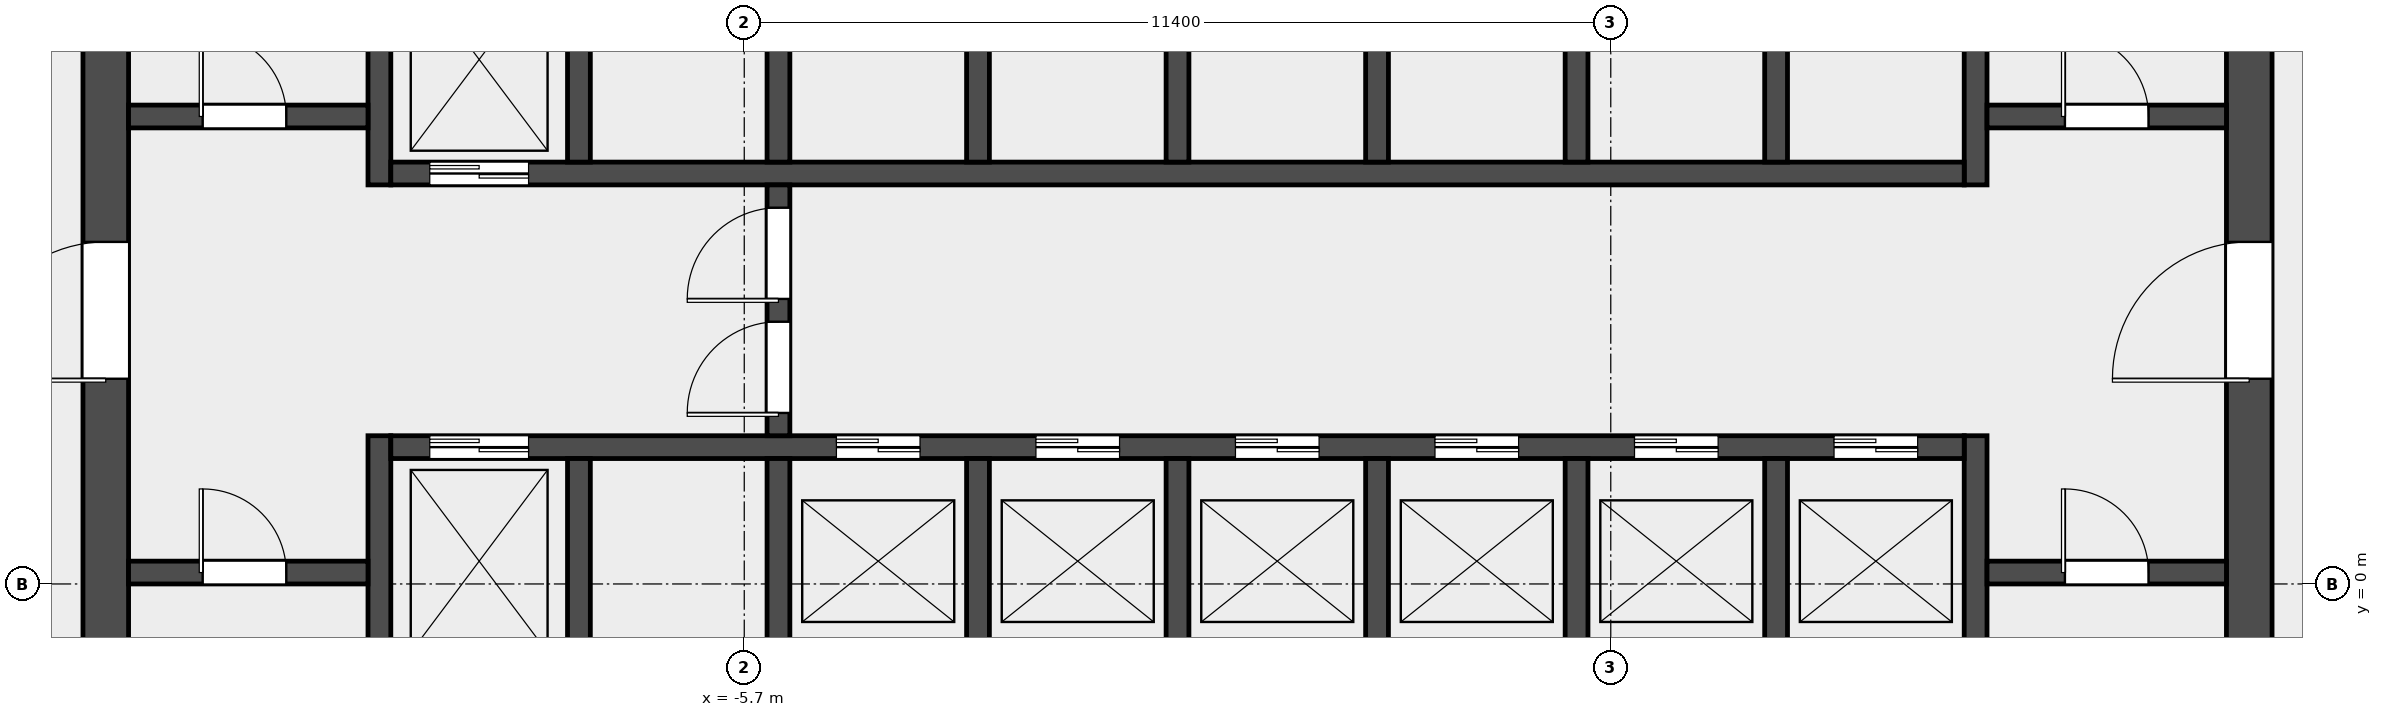
"""IFC4 building model, lengths in metres.
Left out: names, types, materials, properties, quantities, classifications, styles, units other than length and angle.
Written with IfcOpenShell. Run it as: python <this file> out.ifc"""

import sys

from ifc_helpers import new_model, si_unit, direction, frame, frame_2d, origin, place, context, subcontext, project, spatial, rectangle, extrude, element, fill, save


model = new_model("IFC4")
c1 = context("Model", 3, precision=1e-05, world=origin(), true_north=direction((0.0, 1.0)))
c2 = subcontext(c1, "Body", "Model", "MODEL_VIEW")
j1 = project(units=[si_unit("LENGTHUNIT", "METRE"), si_unit("PLANEANGLEUNIT", "RADIAN")], contexts=[c1])
p1 = place(None, origin())
s1 = spatial("IfcSite", under=j1, at=p1, CompositionType="ELEMENT")
p2 = place(p1, origin())
s2 = spatial("IfcBuilding", under=s1, at=p2, CompositionType="ELEMENT")
p3 = place(p2, frame((0.0, 0.0, 181.0)))
s3 = spatial("IfcBuildingStorey", under=s2, at=p3, CompositionType="ELEMENT", Elevation=181.0)
p4 = place(p3, frame((-14.1, -6.6, 0.0), z_axis=(0.0, 0.0, 1.0), x_axis=(0.0, 1.0, 0.0)))
e1 = element("IfcWall", 1, at=p4, inside=s3, PredefinedType="SHEAR", context=c2, shape_type="SweptSolid", body=[
    extrude(rectangle(XDim=19.5, YDim=0.6, at=frame_2d((9.75, 0.0))), origin(), (0.0, 0.0, 1.0), 3.7),
])
p5 = place(p4, frame((9.3, 0.0, 0.0)))
e2 = element("IfcOpeningElement", 2, at=p5, cuts=e1, PredefinedType="OPENING", context=c2, shape_type="SweptSolid", body=[
    extrude(rectangle(XDim=1.8, YDim=2.1, at=frame_2d((0.9, 1.05))), frame((0.0, 0.312, 0.0), z_axis=(0.0, -1.0, 0.0), x_axis=(1.0, 0.0, 0.0)), (0.0, 0.0, 1.0), 0.624),
])
p6 = place(p3, frame((14.1, -6.6, 0.0), z_axis=(0.0, 0.0, 1.0), x_axis=(0.0, 1.0, 0.0)))
e3 = element("IfcWall", 3, at=p6, inside=s3, PredefinedType="SHEAR", context=c2, shape_type="SweptSolid", body=[
    extrude(rectangle(XDim=19.5, YDim=0.6, at=frame_2d((9.75, 0.0))), origin(), (0.0, 0.0, 1.0), 3.7),
])
p7 = place(p6, frame((9.3, 0.0, 0.0)))
e4 = element("IfcOpeningElement", 4, at=p7, cuts=e3, PredefinedType="OPENING", context=c2, shape_type="SweptSolid", body=[
    extrude(rectangle(XDim=1.8, YDim=2.1, at=frame_2d((0.9, 1.05))), frame((0.0, 0.312, 0.0), z_axis=(0.0, -1.0, 0.0), x_axis=(1.0, 0.0, 0.0)), (0.0, 0.0, 1.0), 0.624),
])
p8 = place(p3, frame((-10.5, -6.6, 0.0), z_axis=(0.0, 0.0, 1.0), x_axis=(0.0, 1.0, 0.0)))
e5 = element("IfcWall", 5, at=p8, inside=s3, PredefinedType="SHEAR", context=c2, shape_type="SweptSolid", body=[
    extrude(rectangle(XDim=8.55, YDim=0.3, at=frame_2d((4.275, 0.0))), origin(), (0.0, 0.0, 1.0), 3.7),
])
p9 = place(p3, frame((-10.5, 5.25, 0.0), z_axis=(0.0, 0.0, 1.0), x_axis=(0.0, 1.0, 0.0)))
e6 = element("IfcWall", 6, at=p9, inside=s3, PredefinedType="SHEAR", context=c2, shape_type="SweptSolid", body=[
    extrude(rectangle(XDim=7.65, YDim=0.3, at=frame_2d((3.825, 0.0))), origin(), (0.0, 0.0, 1.0), 3.7),
])
p10 = place(p3, frame((10.5, -6.6, 0.0), z_axis=(0.0, 0.0, 1.0), x_axis=(0.0, 1.0, 0.0)))
e7 = element("IfcWall", 7, at=p10, inside=s3, PredefinedType="SHEAR", context=c2, shape_type="SweptSolid", body=[
    extrude(rectangle(XDim=8.55, YDim=0.3, at=frame_2d((4.275, 0.0))), origin(), (0.0, 0.0, 1.0), 3.7),
])
p11 = place(p3, frame((10.5, 5.25, 0.0), z_axis=(0.0, 0.0, 1.0), x_axis=(0.0, 1.0, 0.0)))
e8 = element("IfcWall", 8, at=p11, inside=s3, PredefinedType="SHEAR", context=c2, shape_type="SweptSolid", body=[
    extrude(rectangle(XDim=7.65, YDim=0.3, at=frame_2d((3.825, 0.0))), origin(), (0.0, 0.0, 1.0), 3.7),
])
p12 = place(p3, frame((-13.8, 0.15, 0.0), z_axis=(0.0, 0.0, 1.0), x_axis=(1.0, 0.0, 0.0)))
e9 = element("IfcWall", 9, at=p12, inside=s3, PredefinedType="SOLIDWALL", context=c2, shape_type="SweptSolid", body=[
    extrude(rectangle(XDim=3.15, YDim=0.3, at=frame_2d((1.575, 0.0))), origin(), (0.0, 0.0, 1.0), 3.7),
])
p13 = place(p12, frame((0.975, 0.0, 0.0)))
e10 = element("IfcOpeningElement", 10, at=p13, cuts=e9, PredefinedType="OPENING", context=c2, shape_type="SweptSolid", body=[
    extrude(rectangle(XDim=1.1, YDim=2.1, at=frame_2d((0.55, 1.05))), frame((0.0, 0.162, 0.0), z_axis=(0.0, -1.0, 0.0), x_axis=(1.0, 0.0, 0.0)), (0.0, 0.0, 1.0), 0.324),
])
p14 = place(p3, frame((-13.8, 6.15, 0.0), z_axis=(0.0, 0.0, 1.0), x_axis=(1.0, 0.0, 0.0)))
e11 = element("IfcWall", 11, at=p14, inside=s3, PredefinedType="SOLIDWALL", context=c2, shape_type="SweptSolid", body=[
    extrude(rectangle(XDim=3.15, YDim=0.3, at=frame_2d((1.575, 0.0))), origin(), (0.0, 0.0, 1.0), 3.7),
])
p15 = place(p14, frame((0.975, 0.0, 0.0)))
e12 = element("IfcOpeningElement", 12, at=p15, cuts=e11, PredefinedType="OPENING", context=c2, shape_type="SweptSolid", body=[
    extrude(rectangle(XDim=1.1, YDim=2.1, at=frame_2d((0.55, 1.05))), frame((0.0, 0.162, 0.0), z_axis=(0.0, -1.0, 0.0), x_axis=(1.0, 0.0, 0.0)), (0.0, 0.0, 1.0), 0.324),
])
p16 = place(p3, frame((10.65, 0.15, 0.0), z_axis=(0.0, 0.0, 1.0), x_axis=(1.0, 0.0, 0.0)))
e13 = element("IfcWall", 13, at=p16, inside=s3, PredefinedType="SOLIDWALL", context=c2, shape_type="SweptSolid", body=[
    extrude(rectangle(XDim=3.15, YDim=0.3, at=frame_2d((1.575, 0.0))), origin(), (0.0, 0.0, 1.0), 3.7),
])
p17 = place(p16, frame((1.025, 0.0, 0.0)))
e14 = element("IfcOpeningElement", 14, at=p17, cuts=e13, PredefinedType="OPENING", context=c2, shape_type="SweptSolid", body=[
    extrude(rectangle(XDim=1.1, YDim=2.1, at=frame_2d((0.55, 1.05))), frame((0.0, 0.162, 0.0), z_axis=(0.0, -1.0, 0.0), x_axis=(1.0, 0.0, 0.0)), (0.0, 0.0, 1.0), 0.324),
])
p18 = place(p3, frame((10.65, 6.15, 0.0), z_axis=(0.0, 0.0, 1.0), x_axis=(1.0, 0.0, 0.0)))
e15 = element("IfcWall", 15, at=p18, inside=s3, PredefinedType="SOLIDWALL", context=c2, shape_type="SweptSolid", body=[
    extrude(rectangle(XDim=3.15, YDim=0.3, at=frame_2d((1.575, 0.0))), origin(), (0.0, 0.0, 1.0), 3.7),
])
p19 = place(p18, frame((1.025, 0.0, 0.0)))
e16 = element("IfcOpeningElement", 16, at=p19, cuts=e15, PredefinedType="OPENING", context=c2, shape_type="SweptSolid", body=[
    extrude(rectangle(XDim=1.1, YDim=2.1, at=frame_2d((0.55, 1.05))), frame((0.0, 0.162, 0.0), z_axis=(0.0, -1.0, 0.0), x_axis=(1.0, 0.0, 0.0)), (0.0, 0.0, 1.0), 0.324),
])
p20 = place(p3, frame((-10.35, 1.8, 0.0), z_axis=(0.0, 0.0, 1.0), x_axis=(1.0, 0.0, 0.0)))
e17 = element("IfcWall", 17, at=p20, inside=s3, PredefinedType="SOLIDWALL", context=c2, shape_type="SweptSolid", body=[
    extrude(rectangle(XDim=20.7, YDim=0.3, at=frame_2d((10.35, 0.0))), origin(), (0.0, 0.0, 1.0), 3.7),
])
p21 = place(p20, frame((0.512, 0.0, 0.0)))
e18 = element("IfcOpeningElement", 18, at=p21, cuts=e17, PredefinedType="OPENING", context=c2, shape_type="SweptSolid", body=[
    extrude(rectangle(XDim=1.3, YDim=2.1, at=frame_2d((0.65, 1.05))), frame((0.0, 0.162, 0.0), z_axis=(0.0, -1.0, 0.0), x_axis=(1.0, 0.0, 0.0)), (0.0, 0.0, 1.0), 0.324),
])
p22 = place(p20, frame((5.863, 0.0, 0.0)))
e19 = element("IfcOpeningElement", 19, at=p22, cuts=e17, PredefinedType="OPENING", context=c2, shape_type="SweptSolid", body=[
    extrude(rectangle(XDim=1.1, YDim=2.1, at=frame_2d((0.55, 1.05))), frame((0.0, 0.162, 0.0), z_axis=(0.0, -1.0, 0.0), x_axis=(1.0, 0.0, 0.0)), (0.0, 0.0, 1.0), 0.324),
])
p23 = place(p20, frame((8.488, 0.0, 0.0)))
e20 = element("IfcOpeningElement", 20, at=p23, cuts=e17, PredefinedType="OPENING", context=c2, shape_type="SweptSolid", body=[
    extrude(rectangle(XDim=1.1, YDim=2.1, at=frame_2d((0.55, 1.05))), frame((0.0, 0.162, 0.0), z_axis=(0.0, -1.0, 0.0), x_axis=(1.0, 0.0, 0.0)), (0.0, 0.0, 1.0), 0.324),
])
p24 = place(p20, frame((11.113, 0.0, 0.0)))
e21 = element("IfcOpeningElement", 21, at=p24, cuts=e17, PredefinedType="OPENING", context=c2, shape_type="SweptSolid", body=[
    extrude(rectangle(XDim=1.1, YDim=2.1, at=frame_2d((0.55, 1.05))), frame((0.0, 0.162, 0.0), z_axis=(0.0, -1.0, 0.0), x_axis=(1.0, 0.0, 0.0)), (0.0, 0.0, 1.0), 0.324),
])
p25 = place(p20, frame((13.738, 0.0, 0.0)))
e22 = element("IfcOpeningElement", 22, at=p25, cuts=e17, PredefinedType="OPENING", context=c2, shape_type="SweptSolid", body=[
    extrude(rectangle(XDim=1.1, YDim=2.1, at=frame_2d((0.55, 1.05))), frame((0.0, 0.162, 0.0), z_axis=(0.0, -1.0, 0.0), x_axis=(1.0, 0.0, 0.0)), (0.0, 0.0, 1.0), 0.324),
])
p26 = place(p20, frame((16.363, 0.0, 0.0)))
e23 = element("IfcOpeningElement", 23, at=p26, cuts=e17, PredefinedType="OPENING", context=c2, shape_type="SweptSolid", body=[
    extrude(rectangle(XDim=1.1, YDim=2.1, at=frame_2d((0.55, 1.05))), frame((0.0, 0.162, 0.0), z_axis=(0.0, -1.0, 0.0), x_axis=(1.0, 0.0, 0.0)), (0.0, 0.0, 1.0), 0.324),
])
p27 = place(p20, frame((18.988, 0.0, 0.0)))
e24 = element("IfcOpeningElement", 24, at=p27, cuts=e17, PredefinedType="OPENING", context=c2, shape_type="SweptSolid", body=[
    extrude(rectangle(XDim=1.1, YDim=2.1, at=frame_2d((0.55, 1.05))), frame((0.0, 0.162, 0.0), z_axis=(0.0, -1.0, 0.0), x_axis=(1.0, 0.0, 0.0)), (0.0, 0.0, 1.0), 0.324),
])
p28 = place(p3, frame((-10.35, 5.4, 0.0), z_axis=(0.0, 0.0, 1.0), x_axis=(1.0, 0.0, 0.0)))
e25 = element("IfcWall", 25, at=p28, inside=s3, PredefinedType="SOLIDWALL", context=c2, shape_type="SweptSolid", body=[
    extrude(rectangle(XDim=20.7, YDim=0.3, at=frame_2d((10.35, 0.0))), origin(), (0.0, 0.0, 1.0), 3.7),
])
p29 = place(p28, frame((0.512, 0.0, 0.0)))
e26 = element("IfcOpeningElement", 26, at=p29, cuts=e25, PredefinedType="OPENING", context=c2, shape_type="SweptSolid", body=[
    extrude(rectangle(XDim=1.3, YDim=2.1, at=frame_2d((0.65, 1.05))), frame((0.0, 0.162, 0.0), z_axis=(0.0, -1.0, 0.0), x_axis=(1.0, 0.0, 0.0)), (0.0, 0.0, 1.0), 0.324),
])
for number, where, z_axis, x_axis in (
    (27, (-7.875, -1.05, 0.0), (0.0, 0.0, 1.0), (0.0, 1.0, 0.0)),
    (28, (-5.25, -1.05, 0.0), (0.0, 0.0, 1.0), (0.0, 1.0, 0.0)),
    (29, (-2.625, -1.05, 0.0), (0.0, 0.0, 1.0), (0.0, 1.0, 0.0)),
    (30, (0.0, -1.05, 0.0), (0.0, 0.0, 1.0), (0.0, 1.0, 0.0)),
    (31, (2.625, -1.05, 0.0), (0.0, 0.0, 1.0), (0.0, 1.0, 0.0)),
    (32, (5.25, -1.05, 0.0), (0.0, 0.0, 1.0), (0.0, 1.0, 0.0)),
    (33, (7.875, -1.05, 0.0), (0.0, 0.0, 1.0), (0.0, 1.0, 0.0)),
    (34, (-7.875, 5.55, 0.0), (0.0, 0.0, 1.0), (0.0, 1.0, 0.0)),
    (35, (-5.25, 5.55, 0.0), (0.0, 0.0, 1.0), (0.0, 1.0, 0.0)),
    (36, (-2.625, 5.55, 0.0), (0.0, 0.0, 1.0), (0.0, 1.0, 0.0)),
    (37, (0.0, 5.55, 0.0), (0.0, 0.0, 1.0), (0.0, 1.0, 0.0)),
    (38, (2.625, 5.55, 0.0), (0.0, 0.0, 1.0), (0.0, 1.0, 0.0)),
    (39, (5.25, 5.55, 0.0), (0.0, 0.0, 1.0), (0.0, 1.0, 0.0)),
    (40, (7.875, 5.55, 0.0), (0.0, 0.0, 1.0), (0.0, 1.0, 0.0)),
):
    element("IfcWall", number, at=place(p3, frame(where, z_axis=z_axis, x_axis=x_axis)), inside=s3, PredefinedType="SOLIDWALL", context=c2, shape_type="SweptSolid", body=[
        extrude(rectangle(XDim=2.7, YDim=0.3, at=frame_2d((1.35, 0.0))), origin(), (0.0, 0.0, 1.0), 3.7),
    ])
p30 = place(p3, frame((-5.25, 1.95, 0.0), z_axis=(0.0, 0.0, 1.0), x_axis=(0.0, 1.0, 0.0)))
e41 = element("IfcWall", 41, at=p30, inside=s3, PredefinedType="SOLIDWALL", context=c2, shape_type="SweptSolid", body=[
    extrude(rectangle(XDim=3.3, YDim=0.3, at=frame_2d((1.65, 0.0))), origin(), (0.0, 0.0, 1.0), 3.7),
])
p31 = place(p30, frame((0.3, 0.0, 0.0)))
e42 = element("IfcOpeningElement", 42, at=p31, cuts=e41, PredefinedType="OPENING", context=c2, shape_type="SweptSolid", body=[
    extrude(rectangle(XDim=1.2, YDim=2.1, at=frame_2d((0.6, 1.05))), frame((0.0, 0.162, 0.0), z_axis=(0.0, -1.0, 0.0), x_axis=(1.0, 0.0, 0.0)), (0.0, 0.0, 1.0), 0.324),
])
p32 = place(p30, frame((1.8, 0.0, 0.0)))
e43 = element("IfcOpeningElement", 43, at=p32, cuts=e41, PredefinedType="OPENING", context=c2, shape_type="SweptSolid", body=[
    extrude(rectangle(XDim=1.2, YDim=2.1, at=frame_2d((0.6, 1.05))), frame((0.0, 0.162, 0.0), z_axis=(0.0, -1.0, 0.0), x_axis=(1.0, 0.0, 0.0)), (0.0, 0.0, 1.0), 0.324),
])
p33 = place(p13, origin())
e44 = element("IfcDoor", 44, at=p33, inside=s3, OperationType="SINGLE_SWING_LEFT", PredefinedType="DOOR", context=c2, shape_type="SweptSolid", body=[
    extrude(rectangle(XDim=1.1, YDim=2.1, at=frame_2d((0.55, 1.05))), frame((0.0, 0.025, 0.0), z_axis=(0.0, -1.0, 0.0), x_axis=(1.0, 0.0, 0.0)), (0.0, 0.0, 1.0), 0.05),
])
fill(e10, e44)
p34 = place(p15, origin())
e45 = element("IfcDoor", 45, at=p34, inside=s3, OperationType="SINGLE_SWING_LEFT", PredefinedType="DOOR", context=c2, shape_type="SweptSolid", body=[
    extrude(rectangle(XDim=1.1, YDim=2.1, at=frame_2d((0.55, 1.05))), frame((0.0, 0.025, 0.0), z_axis=(0.0, -1.0, 0.0), x_axis=(1.0, 0.0, 0.0)), (0.0, 0.0, 1.0), 0.05),
])
fill(e12, e45)
p35 = place(p17, origin())
e46 = element("IfcDoor", 46, at=p35, inside=s3, OperationType="SINGLE_SWING_RIGHT", PredefinedType="DOOR", context=c2, shape_type="SweptSolid", body=[
    extrude(rectangle(XDim=1.1, YDim=2.1, at=frame_2d((0.55, 1.05))), frame((0.0, 0.025, 0.0), z_axis=(0.0, -1.0, 0.0), x_axis=(1.0, 0.0, 0.0)), (0.0, 0.0, 1.0), 0.05),
])
fill(e14, e46)
p36 = place(p19, origin())
e47 = element("IfcDoor", 47, at=p36, inside=s3, OperationType="SINGLE_SWING_RIGHT", PredefinedType="DOOR", context=c2, shape_type="SweptSolid", body=[
    extrude(rectangle(XDim=1.1, YDim=2.1, at=frame_2d((0.55, 1.05))), frame((0.0, 0.025, 0.0), z_axis=(0.0, -1.0, 0.0), x_axis=(1.0, 0.0, 0.0)), (0.0, 0.0, 1.0), 0.05),
])
fill(e16, e47)
p37 = place(p5, origin())
e48 = element("IfcDoor", 48, at=p37, inside=s3, OperationType="DOUBLE_DOOR_SINGLE_SWING", PredefinedType="DOOR", context=c2, shape_type="SweptSolid", body=[
    extrude(rectangle(XDim=1.8, YDim=2.1, at=frame_2d((0.9, 1.05))), frame((0.0, 0.025, 0.0), z_axis=(0.0, -1.0, 0.0), x_axis=(1.0, 0.0, 0.0)), (0.0, 0.0, 1.0), 0.05),
])
fill(e2, e48)
p38 = place(p7, origin())
e49 = element("IfcDoor", 49, at=p38, inside=s3, OperationType="DOUBLE_DOOR_SINGLE_SWING", PredefinedType="DOOR", context=c2, shape_type="SweptSolid", body=[
    extrude(rectangle(XDim=1.8, YDim=2.1, at=frame_2d((0.9, 1.05))), frame((0.0, 0.025, 0.0), z_axis=(0.0, -1.0, 0.0), x_axis=(1.0, 0.0, 0.0)), (0.0, 0.0, 1.0), 0.05),
])
fill(e4, e49)
p39 = place(p31, origin())
e50 = element("IfcDoor", 50, at=p39, inside=s3, OperationType="SINGLE_SWING_LEFT", PredefinedType="DOOR", context=c2, shape_type="SweptSolid", body=[
    extrude(rectangle(XDim=1.2, YDim=2.1, at=frame_2d((0.6, 1.05))), frame((0.0, 0.025, 0.0), z_axis=(0.0, -1.0, 0.0), x_axis=(1.0, 0.0, 0.0)), (0.0, 0.0, 1.0), 0.05),
])
fill(e42, e50)
p40 = place(p32, origin())
e51 = element("IfcDoor", 51, at=p40, inside=s3, OperationType="SINGLE_SWING_RIGHT", PredefinedType="DOOR", context=c2, shape_type="SweptSolid", body=[
    extrude(rectangle(XDim=1.2, YDim=2.1, at=frame_2d((0.6, 1.05))), frame((0.0, 0.025, 0.0), z_axis=(0.0, -1.0, 0.0), x_axis=(1.0, 0.0, 0.0)), (0.0, 0.0, 1.0), 0.05),
])
fill(e43, e51)
p41 = place(p21, origin())
e52 = element("IfcDoor", 52, at=p41, inside=s3, OperationType="DOUBLE_DOOR_SLIDING", PredefinedType="DOOR", context=c2, shape_type="SweptSolid", body=[
    extrude(rectangle(XDim=1.3, YDim=2.1, at=frame_2d((0.65, 1.05))), frame((0.0, 0.025, 0.0), z_axis=(0.0, -1.0, 0.0), x_axis=(1.0, 0.0, 0.0)), (0.0, 0.0, 1.0), 0.05),
])
fill(e18, e52)
p42 = place(p22, origin())
e53 = element("IfcDoor", 53, at=p42, inside=s3, OperationType="DOUBLE_DOOR_SLIDING", PredefinedType="DOOR", context=c2, shape_type="SweptSolid", body=[
    extrude(rectangle(XDim=1.1, YDim=2.1, at=frame_2d((0.55, 1.05))), frame((0.0, 0.025, 0.0), z_axis=(0.0, -1.0, 0.0), x_axis=(1.0, 0.0, 0.0)), (0.0, 0.0, 1.0), 0.05),
])
fill(e19, e53)
p43 = place(p23, origin())
e54 = element("IfcDoor", 54, at=p43, inside=s3, OperationType="DOUBLE_DOOR_SLIDING", PredefinedType="DOOR", context=c2, shape_type="SweptSolid", body=[
    extrude(rectangle(XDim=1.1, YDim=2.1, at=frame_2d((0.55, 1.05))), frame((0.0, 0.025, 0.0), z_axis=(0.0, -1.0, 0.0), x_axis=(1.0, 0.0, 0.0)), (0.0, 0.0, 1.0), 0.05),
])
fill(e20, e54)
p44 = place(p24, origin())
e55 = element("IfcDoor", 55, at=p44, inside=s3, OperationType="DOUBLE_DOOR_SLIDING", PredefinedType="DOOR", context=c2, shape_type="SweptSolid", body=[
    extrude(rectangle(XDim=1.1, YDim=2.1, at=frame_2d((0.55, 1.05))), frame((0.0, 0.025, 0.0), z_axis=(0.0, -1.0, 0.0), x_axis=(1.0, 0.0, 0.0)), (0.0, 0.0, 1.0), 0.05),
])
fill(e21, e55)
p45 = place(p25, origin())
e56 = element("IfcDoor", 56, at=p45, inside=s3, OperationType="DOUBLE_DOOR_SLIDING", PredefinedType="DOOR", context=c2, shape_type="SweptSolid", body=[
    extrude(rectangle(XDim=1.1, YDim=2.1, at=frame_2d((0.55, 1.05))), frame((0.0, 0.025, 0.0), z_axis=(0.0, -1.0, 0.0), x_axis=(1.0, 0.0, 0.0)), (0.0, 0.0, 1.0), 0.05),
])
fill(e22, e56)
p46 = place(p26, origin())
e57 = element("IfcDoor", 57, at=p46, inside=s3, OperationType="DOUBLE_DOOR_SLIDING", PredefinedType="DOOR", context=c2, shape_type="SweptSolid", body=[
    extrude(rectangle(XDim=1.1, YDim=2.1, at=frame_2d((0.55, 1.05))), frame((0.0, 0.025, 0.0), z_axis=(0.0, -1.0, 0.0), x_axis=(1.0, 0.0, 0.0)), (0.0, 0.0, 1.0), 0.05),
])
fill(e23, e57)
p47 = place(p27, origin())
e58 = element("IfcDoor", 58, at=p47, inside=s3, OperationType="DOUBLE_DOOR_SLIDING", PredefinedType="DOOR", context=c2, shape_type="SweptSolid", body=[
    extrude(rectangle(XDim=1.1, YDim=2.1, at=frame_2d((0.55, 1.05))), frame((0.0, 0.025, 0.0), z_axis=(0.0, -1.0, 0.0), x_axis=(1.0, 0.0, 0.0)), (0.0, 0.0, 1.0), 0.05),
])
fill(e24, e58)
p48 = place(p29, origin())
e59 = element("IfcDoor", 59, at=p48, inside=s3, OperationType="DOUBLE_DOOR_SLIDING", PredefinedType="DOOR", context=c2, shape_type="SweptSolid", body=[
    extrude(rectangle(XDim=1.3, YDim=2.1, at=frame_2d((0.65, 1.05))), frame((0.0, 0.025, 0.0), z_axis=(0.0, -1.0, 0.0), x_axis=(1.0, 0.0, 0.0)), (0.0, 0.0, 1.0), 0.05),
])
fill(e26, e59)
save(model, sys.argv[1])
